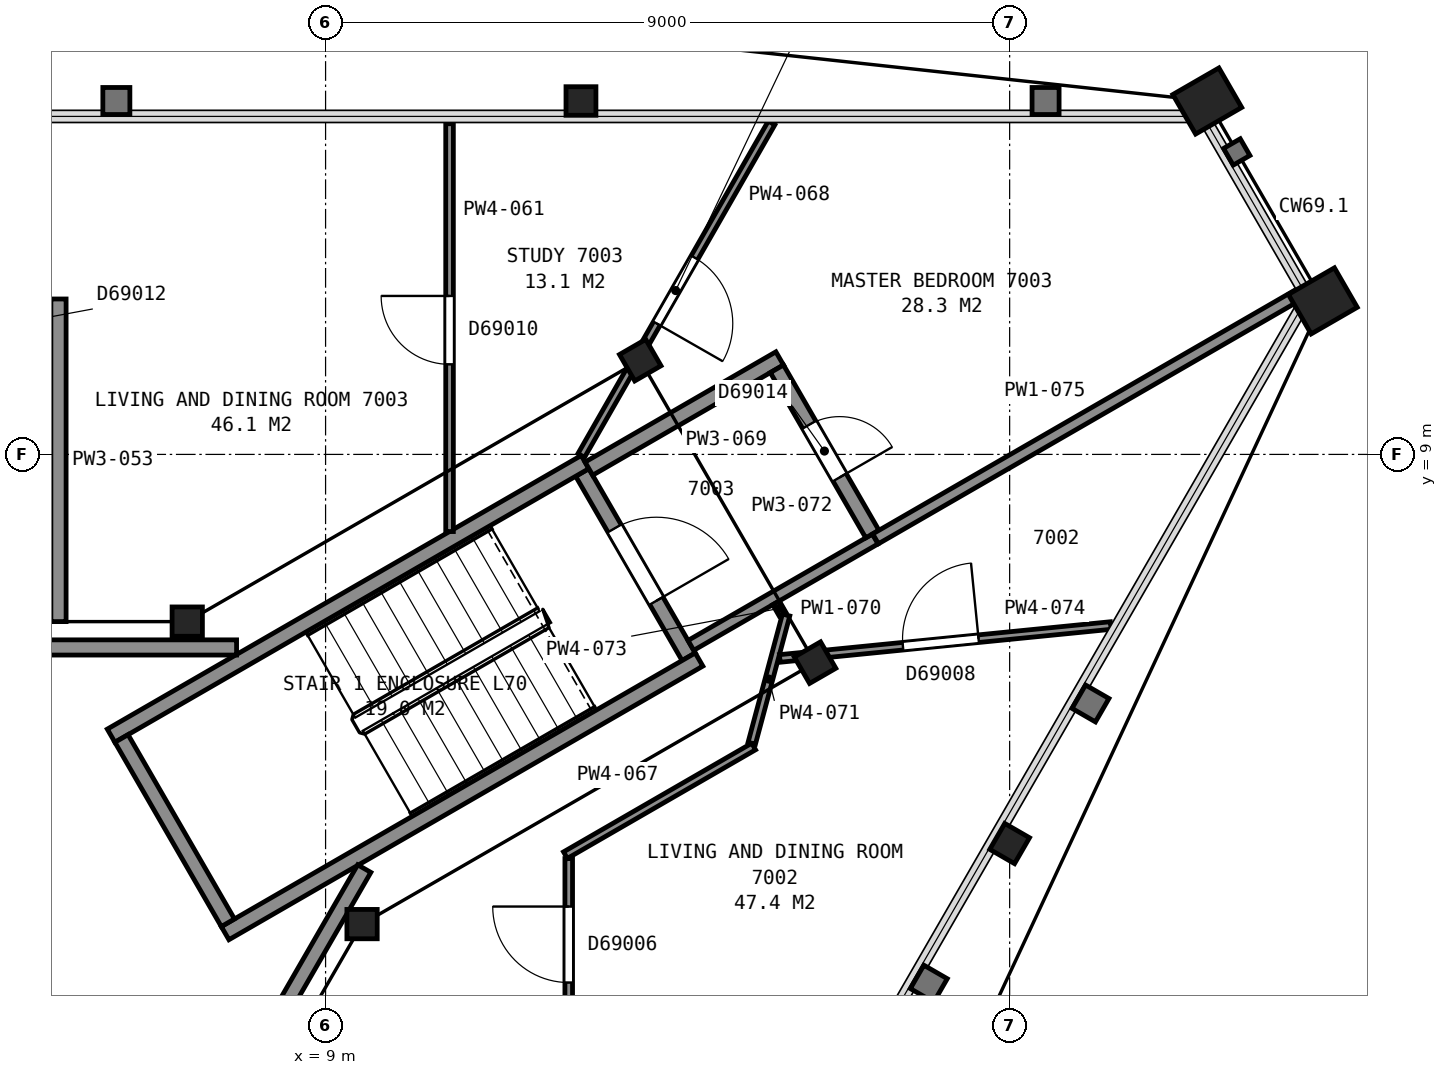
"""IFC4 building model, lengths in metres.
Left out: names, types, materials, properties, quantities, classifications, styles, units other than length and angle.
Written with IfcOpenShell. Run it as: python <this file> out.ifc"""

import sys

from ifc_helpers import new_model, si_unit, direction, frame, frame_2d, origin, origin_2d, place, context, subcontext, project, spatial, rectangle, hollow_rectangle, i_section, extrude, element, fill, save


model = new_model("IFC4")
c1 = context("Model", 3, precision=1e-05, world=origin(), true_north=direction((0.0, 1.0)))
c2 = subcontext(c1, "Body", "Model", "MODEL_VIEW")
j1 = project(units=[si_unit("LENGTHUNIT", "METRE"), si_unit("PLANEANGLEUNIT", "RADIAN")], contexts=[c1])
p1 = place(None, origin())
s1 = spatial("IfcSite", under=j1, at=p1, CompositionType="ELEMENT")
p2 = place(p1, origin())
s2 = spatial("IfcBuilding", under=s1, at=p2, CompositionType="ELEMENT")
p3 = place(p2, frame((0.0, 0.0, 278.8)))
s3 = spatial("IfcBuildingStorey", under=s2, at=p3, CompositionType="ELEMENT", Elevation=278.8)
p4 = place(p3, frame((20.6, 13.65, 0.0), z_axis=(0.0, 0.0, 1.0), x_axis=(0.5, -0.866025403784, 0.0)))
e1 = element("IfcColumn", 1, at=p4, inside=s3, PredefinedType="COLUMN", context=c2, shape_type="SweptSolid", body=[
    extrude(hollow_rectangle(XDim=0.6, YDim=0.7, WallThickness=0.04, at=origin_2d()), origin(), (0.0, 0.0, 1.0), 3.7),
])
for number, where, z_axis, x_axis in (
    (2, (12.36, 13.65, 0.0), (0.0, 0.0, 1.0), (1.0, 0.0, 0.0)),
    (3, (18.0, 3.88, 0.0), (0.0, 0.0, 1.0), (-0.5, -0.866, 0.0)),
):
    element("IfcColumn", number, at=place(p3, frame(where, z_axis=z_axis, x_axis=x_axis)), inside=s3, PredefinedType="COLUMN", context=c2, shape_type="SweptSolid", body=[
        extrude(i_section(OverallWidth=0.394, OverallDepth=0.376, WebThickness=0.017, FlangeThickness=0.028, FilletRadius=0.015, at=origin_2d()), origin(), (0.0, 0.0, 1.0), 3.7),
    ])
p5 = place(p3, frame((22.12, 11.02, 0.0), z_axis=(0.0, 0.0, 1.0), x_axis=(0.5, -0.866025403784, 0.0)))
e4 = element("IfcColumn", 4, at=p5, inside=s3, PredefinedType="COLUMN", context=c2, shape_type="SweptSolid", body=[
    extrude(hollow_rectangle(XDim=0.6, YDim=0.7, WallThickness=0.04, at=origin_2d()), origin(), (0.0, 0.0, 1.0), 3.7),
])
p6 = place(p3, frame((9.48, 2.82, 0.0), z_axis=(0.0, 0.0, 1.0), x_axis=(1.0, 0.0, 0.0)))
e5 = element("IfcColumn", 5, at=p6, inside=s3, PredefinedType="COLUMN", context=c2, shape_type="SweptSolid", body=[
    extrude(i_section(OverallWidth=0.399, OverallDepth=0.386, WebThickness=0.021, FlangeThickness=0.033, FilletRadius=0.015, at=origin_2d()), origin(), (0.0, 0.0, 1.0), 3.7),
])
for number, where, z_axis, x_axis in (
    (6, (15.44, 6.26, 0.0), (0.0, 0.0, 1.0), (0.5, -0.866, 0.0)),
    (7, (13.14, 10.24, 0.0), (0.0, 0.0, 1.0), (0.5, -0.866, 0.0)),
):
    element("IfcColumn", number, at=place(p3, frame(where, z_axis=z_axis, x_axis=x_axis)), inside=s3, PredefinedType="COLUMN", context=c2, shape_type="SweptSolid", body=[
        extrude(i_section(OverallWidth=0.401, OverallDepth=0.399, WebThickness=0.025, FlangeThickness=0.04, FilletRadius=0.015, at=origin_2d()), origin(), (0.0, 0.0, 1.0), 3.7),
    ])
p7 = place(p3, frame((7.18, 6.8, 0.0), z_axis=(0.0, 0.0, 1.0), x_axis=(1.0, 0.0, 0.0)))
e8 = element("IfcColumn", 8, at=p7, inside=s3, PredefinedType="COLUMN", context=c2, shape_type="SweptSolid", body=[
    extrude(i_section(OverallWidth=0.399, OverallDepth=0.386, WebThickness=0.021, FlangeThickness=0.033, FilletRadius=0.015, at=origin_2d()), origin(), (0.0, 0.0, 1.0), 3.7),
])
p8 = place(p3, frame((13.777, 6.338, 0.0), z_axis=(0.0, 0.0, 1.0), x_axis=(-0.500049511043, 0.865996816683, 0.0)))
e9 = element("IfcWall", 9, at=p8, inside=s3, PredefinedType="PARTITIONING", context=c2, shape_type="SweptSolid", body=[
    extrude(rectangle(XDim=2.8, YDim=0.2, at=frame_2d((1.4, 0.0))), origin(), (0.0, 0.0, 1.0), 3.45),
])
p9 = place(p8, frame((0.85, 0.0, 0.0)))
e10 = element("IfcOpeningElement", 10, at=p9, cuts=e9, PredefinedType="OPENING", context=c2, shape_type="SweptSolid", body=[
    extrude(rectangle(XDim=1.1, YDim=2.1, at=frame_2d((0.55, 1.05))), frame((0.0, 0.11, 0.0), z_axis=(0.0, -1.0, 0.0), x_axis=(1.0, 0.0, 0.0)), (0.0, 0.0, 1.0), 0.22),
])
for number, where, z_axis, x_axis in (
    (11, (6.178, 5.299, 0.0), (0.0, 0.0, 1.0), (0.866, 0.5, 0.0)),
    (12, (7.678, 2.701, 0.0), (0.0, 0.0, 1.0), (0.866, 0.5, 0.0)),
):
    element("IfcWall", number, at=place(p3, frame(where, z_axis=z_axis, x_axis=x_axis)), inside=s3, PredefinedType="PARTITIONING", context=c2, shape_type="SweptSolid", body=[
        extrude(rectangle(XDim=7.2, YDim=0.2, at=frame_2d((3.6, 0.0))), origin(), (0.0, 0.0, 1.0), 3.45),
    ])
p10 = place(p3, frame((7.715, 2.838, 0.0), z_axis=(0.0, 0.0, 1.0), x_axis=(-0.500049511043, 0.865996816683, 0.0)))
e13 = element("IfcWall", 13, at=p10, inside=s3, PredefinedType="PARTITIONING", context=c2, shape_type="SweptSolid", body=[
    extrude(rectangle(XDim=2.8, YDim=0.2, at=frame_2d((1.4, 0.0))), origin(), (0.0, 0.0, 1.0), 3.45),
])
p11 = place(p3, frame((7.829, 6.46, 0.0), z_axis=(0.0, 0.0, 1.0), x_axis=(-1.0, 0.0, 0.0)))
e14 = element("IfcWall", 14, at=p11, inside=s3, PredefinedType="PARTITIONING", context=c2, shape_type="SweptSolid", body=[
    extrude(rectangle(XDim=15.658, YDim=0.2, at=frame_2d((7.829, 0.0))), origin(), (0.0, 0.0, 1.0), 3.45),
])
p12 = place(p11, frame((12.168, 0.0, 0.0)))
e15 = element("IfcOpeningElement", 15, at=p12, cuts=e14, PredefinedType="OPENING", context=c2, shape_type="SweptSolid", body=[
    extrude(rectangle(XDim=1.2, YDim=2.1, at=frame_2d((0.6, 1.05))), frame((0.0, 0.11, 0.0), z_axis=(0.0, -1.0, 0.0), x_axis=(1.0, 0.0, 0.0)), (0.0, 0.0, 1.0), 0.22),
])
p13 = place(p3, frame((3.828, -6.29, 0.0), z_axis=(0.0, 0.0, 1.0), x_axis=(0.499979739078, 0.866037101117, 0.0)))
e16 = element("IfcWall", 16, at=p13, inside=s3, PredefinedType="PARTITIONING", context=c2, shape_type="SweptSolid", body=[
    extrude(rectangle(XDim=11.363, YDim=0.2, at=frame_2d((5.681, 0.0))), origin(), (0.0, 0.0, 1.0), 3.45),
])
p14 = place(p13, frame((0.55, 0.0, 0.0)))
e17 = element("IfcOpeningElement", 17, at=p14, cuts=e16, PredefinedType="OPENING", context=c2, shape_type="SweptSolid", body=[
    extrude(rectangle(XDim=1.2, YDim=2.1, at=frame_2d((0.6, 1.05))), frame((0.0, 0.11, 0.0), z_axis=(0.0, -1.0, 0.0), x_axis=(1.0, 0.0, 0.0)), (0.0, 0.0, 1.0), 0.22),
])
p15 = place(p3, frame((5.486, 6.8, 0.0), z_axis=(0.0, 0.0, 1.0), x_axis=(0.0, 1.0, 0.0)))
e18 = element("IfcWall", 18, at=p15, inside=s3, PredefinedType="PARTITIONING", context=c2, shape_type="SweptSolid", body=[
    extrude(rectangle(XDim=4.245, YDim=0.2, at=frame_2d((2.123, 0.0))), origin(), (0.0, 0.0, 1.0), 2.723),
])
p16 = place(p3, frame((10.631, 13.351, 0.0), z_axis=(0.0, 0.0, 1.0), x_axis=(0.0, -1.0, 0.0)))
e19 = element("IfcWall", 19, at=p16, inside=s3, PredefinedType="PARTITIONING", context=c2, shape_type="SweptSolid", body=[
    extrude(rectangle(XDim=5.366, YDim=0.1, at=frame_2d((2.683, 0.0))), origin(), (0.0, 0.0, 1.0), 2.723),
])
p17 = place(p16, frame((2.266, 0.0, 0.0)))
e20 = element("IfcOpeningElement", 20, at=p17, cuts=e19, PredefinedType="OPENING", context=c2, shape_type="SweptSolid", body=[
    extrude(rectangle(XDim=0.9, YDim=2.1, at=frame_2d((0.45, 1.05))), frame((0.0, 0.06, 0.0), z_axis=(0.0, -1.0, 0.0), x_axis=(1.0, 0.0, 0.0)), (0.0, 0.0, 1.0), 0.12),
])
p18 = place(p3, frame((12.199, 3.682, 0.0), z_axis=(0.0, 0.0, 1.0), x_axis=(0.0, -1.0, 0.0)))
e21 = element("IfcWall", 21, at=p18, inside=s3, PredefinedType="PARTITIONING", context=c2, shape_type="SweptSolid", body=[
    extrude(rectangle(XDim=2.331, YDim=0.1, at=frame_2d((1.166, 0.0))), origin(), (0.0, 0.0, 1.0), 2.723),
])
p19 = place(p18, frame((0.631, 0.0, 0.0)))
e22 = element("IfcOpeningElement", 22, at=p19, cuts=e21, PredefinedType="OPENING", context=c2, shape_type="SweptSolid", body=[
    extrude(rectangle(XDim=1.0, YDim=2.1, at=frame_2d((0.5, 1.05))), frame((0.0, 0.06, 0.0), z_axis=(0.0, -1.0, 0.0), x_axis=(1.0, 0.0, 0.0)), (0.0, 0.0, 1.0), 0.12),
])
p20 = place(p3, frame((12.156, 3.727, 0.0), z_axis=(0.0, 0.0, 1.0), x_axis=(0.866012137121, 0.500022977831, 0.0)))
e23 = element("IfcWall", 23, at=p20, inside=s3, PredefinedType="PARTITIONING", context=c2, shape_type="SweptSolid", body=[
    extrude(rectangle(XDim=2.86, YDim=0.1, at=frame_2d((1.43, 0.0))), origin(), (0.0, 0.0, 1.0), 2.723),
])
p21 = place(p3, frame((14.868, 13.362, 0.0), z_axis=(0.0, 0.0, 1.0), x_axis=(-0.496681239155, -0.867933031214, 0.0)))
e24 = element("IfcWall", 24, at=p21, inside=s3, PredefinedType="PARTITIONING", context=c2, shape_type="SweptSolid", body=[
    extrude(rectangle(XDim=5.041, YDim=0.1, at=frame_2d((2.521, 0.0))), origin(), (0.0, 0.0, 1.0), 2.723),
])
p22 = place(p21, frame((2.041, 0.0, 0.0)))
e25 = element("IfcOpeningElement", 25, at=p22, cuts=e24, PredefinedType="OPENING", context=c2, shape_type="SweptSolid", body=[
    extrude(rectangle(XDim=1.0, YDim=2.1, at=frame_2d((0.5, 1.05))), frame((0.0, 0.06, 0.0), z_axis=(0.0, -1.0, 0.0), x_axis=(1.0, 0.0, 0.0)), (0.0, 0.0, 1.0), 0.12),
])
p23 = place(p3, frame((12.464, 8.813, 0.0), z_axis=(0.0, 0.0, 1.0), x_axis=(0.865948555758, 0.50013308107, 0.0)))
e26 = element("IfcWall", 26, at=p23, inside=s3, PredefinedType="PARTITIONING", context=c2, shape_type="SweptSolid", body=[
    extrude(rectangle(XDim=2.899, YDim=0.2, at=frame_2d((1.45, 0.0))), origin(), (0.0, 0.0, 1.0), 2.723),
])
p24 = place(p3, frame((13.806, 6.487, 0.0), z_axis=(0.0, 0.0, 1.0), x_axis=(0.866056369097, 0.49994636267, 0.0)))
e27 = element("IfcWall", 27, at=p24, inside=s3, PredefinedType="PARTITIONING", context=c2, shape_type="SweptSolid", body=[
    extrude(rectangle(XDim=2.8, YDim=0.15, at=frame_2d((1.4, 0.0))), origin(), (0.0, 0.0, 1.0), 2.723),
])
p25 = place(p3, frame((14.607, 5.2, 0.0), z_axis=(0.0, 0.0, 1.0), x_axis=(0.258549793661, 0.965997931777, 0.0)))
e28 = element("IfcWall", 28, at=p25, inside=s3, PredefinedType="PARTITIONING", context=c2, shape_type="SweptSolid", body=[
    extrude(rectangle(XDim=1.747, YDim=0.1, at=frame_2d((0.874, 0.0))), origin(), (0.0, 0.0, 1.0), 2.723),
])
p26 = place(p3, frame((16.194, 7.952, 0.0), z_axis=(0.0, 0.0, 1.0), x_axis=(-0.500039460523, 0.866002620042, 0.0)))
e29 = element("IfcWall", 29, at=p26, inside=s3, PredefinedType="PARTITIONING", context=c2, shape_type="SweptSolid", body=[
    extrude(rectangle(XDim=2.511, YDim=0.2, at=frame_2d((1.255, 0.0))), origin(), (0.0, 0.0, 1.0), 2.723),
])
p27 = place(p26, frame((0.861, 0.0, 0.0)))
e30 = element("IfcOpeningElement", 30, at=p27, cuts=e29, PredefinedType="OPENING", context=c2, shape_type="SweptSolid", body=[
    extrude(rectangle(XDim=0.8, YDim=2.1, at=frame_2d((0.4, 1.05))), frame((0.0, 0.11, 0.0), z_axis=(0.0, -1.0, 0.0), x_axis=(1.0, 0.0, 0.0)), (0.0, 0.0, 1.0), 0.22),
])
p28 = place(p3, frame((14.927, 7.047, 0.0), z_axis=(0.0, 0.0, 1.0), x_axis=(0.497687197367, -0.867356589631, 0.0)))
e31 = element("IfcWall", 31, at=p28, inside=s3, PredefinedType="PARTITIONING", context=c2, shape_type="SweptSolid", body=[
    extrude(rectangle(XDim=0.17, YDim=0.1, at=frame_2d((0.085, 0.0))), origin(), (0.0, 0.0, 1.0), 2.723),
])
p29 = place(p3, frame((14.976, 6.315, 0.0), z_axis=(0.0, 0.0, 1.0), x_axis=(0.995082940066, 0.09904515329, 0.0)))
e32 = element("IfcWall", 32, at=p29, inside=s3, PredefinedType="PARTITIONING", context=c2, shape_type="SweptSolid", body=[
    extrude(rectangle(XDim=4.375, YDim=0.1, at=frame_2d((2.188, 0.0))), origin(), (0.0, 0.0, 1.0), 2.723),
])
p30 = place(p29, frame((1.628, 0.0, 0.0)))
e33 = element("IfcOpeningElement", 33, at=p30, cuts=e32, PredefinedType="OPENING", context=c2, shape_type="SweptSolid", body=[
    extrude(rectangle(XDim=1.0, YDim=2.1, at=frame_2d((0.5, 1.05))), frame((0.0, 0.06, 0.0), z_axis=(0.0, -1.0, 0.0), x_axis=(1.0, 0.0, 0.0)), (0.0, 0.0, 1.0), 0.12),
])
p31 = place(p3, frame((16.236, 7.889, 0.0), z_axis=(0.0, 0.0, 1.0), x_axis=(0.865995456094, 0.500051867335, 0.0)))
e34 = element("IfcWall", 34, at=p31, inside=s3, PredefinedType="PARTITIONING", context=c2, shape_type="SweptSolid", body=[
    extrude(rectangle(XDim=6.415, YDim=0.15, at=frame_2d((3.208, 0.0))), origin(), (0.0, 0.0, 1.0), 2.723),
])
p32 = place(p9, origin())
e35 = element("IfcDoor", 35, at=p32, inside=s3, OperationType="SINGLE_SWING_LEFT", PredefinedType="DOOR", context=c2, shape_type="SweptSolid", body=[
    extrude(rectangle(XDim=1.1, YDim=2.1, at=frame_2d((0.55, 1.05))), frame((0.0, 0.025, 0.0), z_axis=(0.0, -1.0, 0.0), x_axis=(1.0, 0.0, 0.0)), (0.0, 0.0, 1.0), 0.05),
])
fill(e10, e35)
p33 = place(p17, origin())
e36 = element("IfcDoor", 36, at=p33, inside=s3, OperationType="SINGLE_SWING_LEFT", PredefinedType="DOOR", context=c2, shape_type="SweptSolid", body=[
    extrude(rectangle(XDim=0.9, YDim=2.1, at=frame_2d((0.45, 1.05))), frame((0.0, 0.025, 0.0), z_axis=(0.0, -1.0, 0.0), x_axis=(1.0, 0.0, 0.0)), (0.0, 0.0, 1.0), 0.05),
])
fill(e20, e36)
p34 = place(p19, origin())
e37 = element("IfcDoor", 37, at=p34, inside=s3, OperationType="SINGLE_SWING_LEFT", PredefinedType="DOOR", context=c2, shape_type="SweptSolid", body=[
    extrude(rectangle(XDim=1.0, YDim=2.1, at=frame_2d((0.5, 1.05))), frame((0.0, 0.025, 0.0), z_axis=(0.0, -1.0, 0.0), x_axis=(1.0, 0.0, 0.0)), (0.0, 0.0, 1.0), 0.05),
])
fill(e22, e37)
p35 = place(p22, origin())
e38 = element("IfcDoor", 38, at=p35, inside=s3, OperationType="SINGLE_SWING_RIGHT", PredefinedType="DOOR", context=c2, shape_type="SweptSolid", body=[
    extrude(rectangle(XDim=1.0, YDim=2.1, at=frame_2d((0.5, 1.05))), frame((0.0, 0.025, 0.0), z_axis=(0.0, -1.0, 0.0), x_axis=(1.0, 0.0, 0.0)), (0.0, 0.0, 1.0), 0.05),
])
fill(e25, e38)
p36 = place(p27, origin())
e39 = element("IfcDoor", 39, at=p36, inside=s3, OperationType="SINGLE_SWING_LEFT", PredefinedType="DOOR", context=c2, shape_type="SweptSolid", body=[
    extrude(rectangle(XDim=0.8, YDim=2.1, at=frame_2d((0.4, 1.05))), frame((0.0, 0.025, 0.0), z_axis=(0.0, -1.0, 0.0), x_axis=(1.0, 0.0, 0.0)), (0.0, 0.0, 1.0), 0.05),
])
fill(e30, e39)
p37 = place(p30, origin())
e40 = element("IfcDoor", 40, at=p37, inside=s3, OperationType="SINGLE_SWING_RIGHT", PredefinedType="DOOR", context=c2, shape_type="SweptSolid", body=[
    extrude(rectangle(XDim=1.0, YDim=2.1, at=frame_2d((0.5, 1.05))), frame((0.0, 0.025, 0.0), z_axis=(0.0, -1.0, 0.0), x_axis=(1.0, 0.0, 0.0)), (0.0, 0.0, 1.0), 0.05),
])
fill(e33, e40)
save(model, sys.argv[1])
